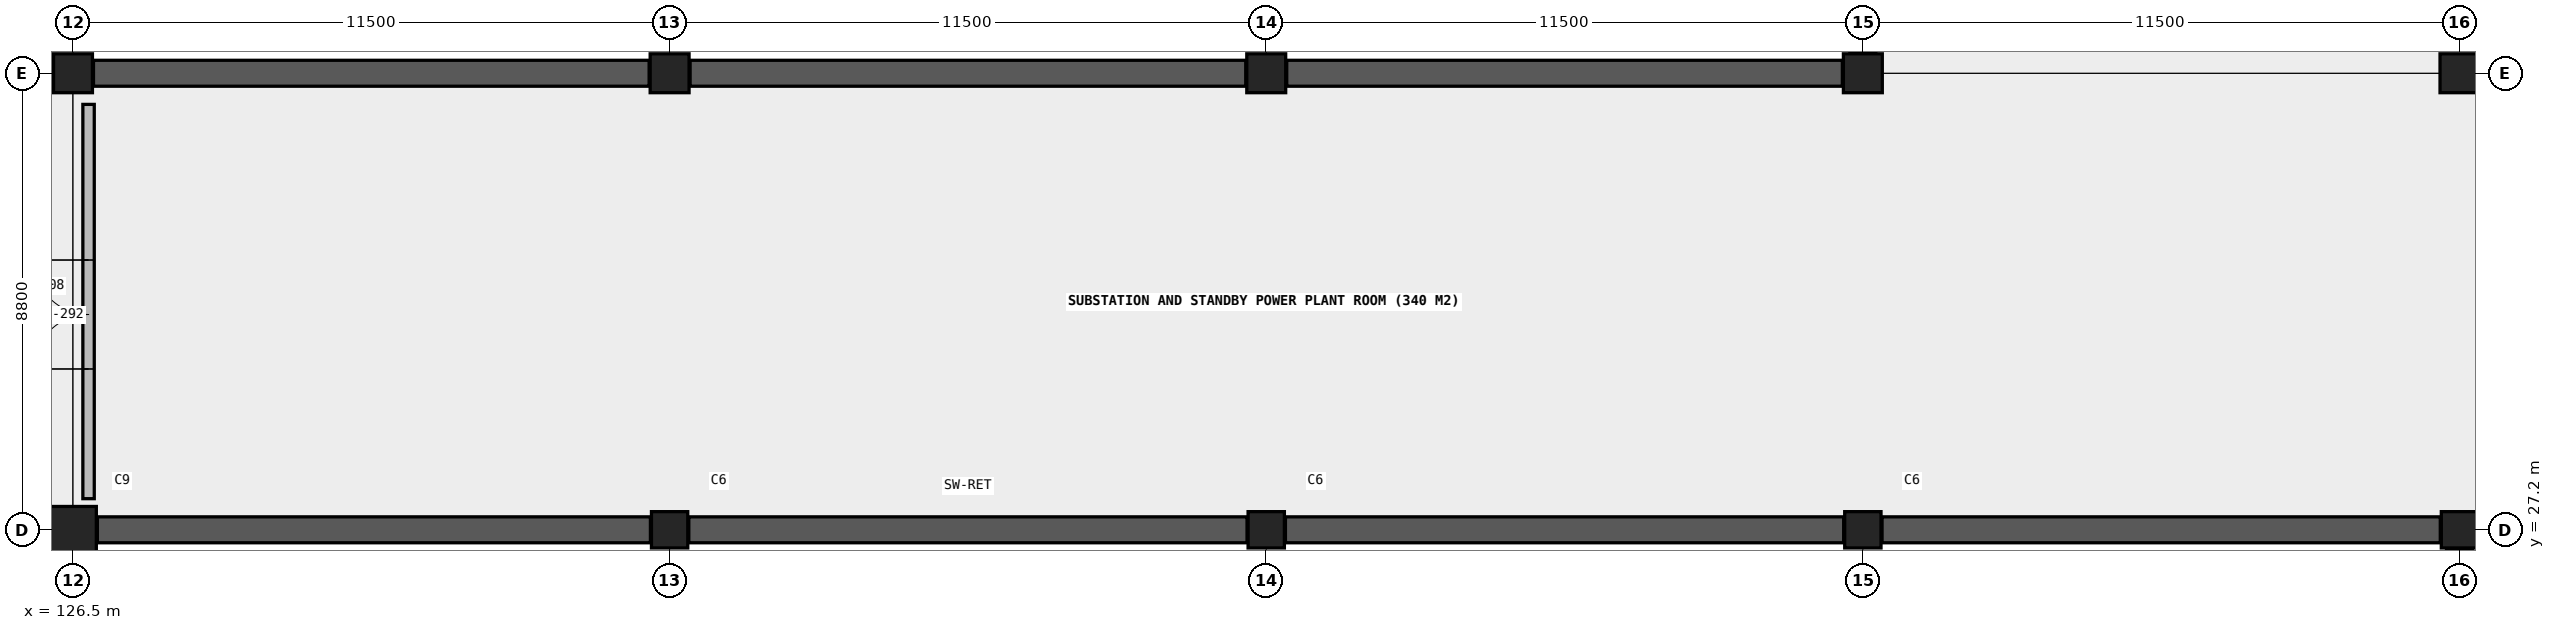
"""IFC4 building model, lengths in metres.
Left out: names, types, materials, properties, quantities, classifications, styles, units other than length and angle.
Written with IfcOpenShell. Run it as: python <this file> out.ifc"""

import sys

from ifc_helpers import new_model, si_unit, direction, frame, frame_2d, origin, origin_2d, place, context, subcontext, project, spatial, rectangle, circle, extrude, element, fill, save


model = new_model("IFC4")
c1 = context("Model", 3, precision=1e-05, world=origin(), true_north=direction((0.0, 1.0)))
c2 = subcontext(c1, "Body", "Model", "MODEL_VIEW")
j1 = project(units=[si_unit("LENGTHUNIT", "METRE"), si_unit("PLANEANGLEUNIT", "RADIAN")], contexts=[c1])
p1 = place(None, origin())
s1 = spatial("IfcSite", under=j1, at=p1, CompositionType="ELEMENT")
p2 = place(p1, origin())
s2 = spatial("IfcBuilding", under=s1, at=p2, CompositionType="ELEMENT")
p3 = place(p2, frame((0.0, 0.0, -4.2)))
s3 = spatial("IfcBuildingStorey", under=s2, at=p3, CompositionType="ELEMENT", Elevation=-4.2)
p4 = place(p3, frame((126.5, 27.2, 0.0), z_axis=(0.0, 0.0, 1.0), x_axis=(1.0, 0.0, 0.0)))
e1 = element("IfcColumn", 1, at=p4, inside=s3, PredefinedType="COLUMN", context=c2, shape_type="SweptSolid", body=[
    extrude(circle(Radius=0.45, at=origin_2d()), origin(), (0.0, 0.0, 1.0), 4.2),
])
p5 = place(p3, frame((126.5, 36.0, 0.0), z_axis=(0.0, 0.0, 1.0), x_axis=(1.0, 0.0, 0.0)))
e2 = element("IfcColumn", 2, at=p5, inside=s3, PredefinedType="COLUMN", context=c2, shape_type="SweptSolid", body=[
    extrude(rectangle(XDim=0.75, YDim=0.75, at=origin_2d()), origin(), (0.0, 0.0, 1.0), 4.2),
])
p6 = place(p3, frame((138.0, 27.2, 0.0), z_axis=(0.0, 0.0, 1.0), x_axis=(1.0, 0.0, 0.0)))
e3 = element("IfcColumn", 3, at=p6, inside=s3, PredefinedType="COLUMN", context=c2, shape_type="SweptSolid", body=[
    extrude(rectangle(XDim=0.7, YDim=0.7, at=origin_2d()), origin(), (0.0, 0.0, 1.0), 4.2),
])
p7 = place(p3, frame((138.0, 36.0, 0.0), z_axis=(0.0, 0.0, 1.0), x_axis=(1.0, 0.0, 0.0)))
e4 = element("IfcColumn", 4, at=p7, inside=s3, PredefinedType="COLUMN", context=c2, shape_type="SweptSolid", body=[
    extrude(rectangle(XDim=0.75, YDim=0.75, at=origin_2d()), origin(), (0.0, 0.0, 1.0), 4.2),
])
p8 = place(p3, frame((149.5, 27.2, 0.0), z_axis=(0.0, 0.0, 1.0), x_axis=(1.0, 0.0, 0.0)))
e5 = element("IfcColumn", 5, at=p8, inside=s3, PredefinedType="COLUMN", context=c2, shape_type="SweptSolid", body=[
    extrude(rectangle(XDim=0.7, YDim=0.7, at=origin_2d()), origin(), (0.0, 0.0, 1.0), 4.2),
])
p9 = place(p3, frame((149.5, 36.0, 0.0), z_axis=(0.0, 0.0, 1.0), x_axis=(1.0, 0.0, 0.0)))
e6 = element("IfcColumn", 6, at=p9, inside=s3, PredefinedType="COLUMN", context=c2, shape_type="SweptSolid", body=[
    extrude(rectangle(XDim=0.75, YDim=0.75, at=origin_2d()), origin(), (0.0, 0.0, 1.0), 4.2),
])
p10 = place(p3, frame((161.0, 27.2, 0.0), z_axis=(0.0, 0.0, 1.0), x_axis=(1.0, 0.0, 0.0)))
e7 = element("IfcColumn", 7, at=p10, inside=s3, PredefinedType="COLUMN", context=c2, shape_type="SweptSolid", body=[
    extrude(rectangle(XDim=0.7, YDim=0.7, at=origin_2d()), origin(), (0.0, 0.0, 1.0), 4.2),
])
p11 = place(p3, frame((161.0, 36.0, 0.0), z_axis=(0.0, 0.0, 1.0), x_axis=(1.0, 0.0, 0.0)))
e8 = element("IfcColumn", 8, at=p11, inside=s3, PredefinedType="COLUMN", context=c2, shape_type="SweptSolid", body=[
    extrude(rectangle(XDim=0.75, YDim=0.75, at=origin_2d()), origin(), (0.0, 0.0, 1.0), 4.2),
])
p12 = place(p3, frame((172.5, 27.2, 0.0), z_axis=(0.0, 0.0, 1.0), x_axis=(1.0, 0.0, 0.0)))
e9 = element("IfcColumn", 9, at=p12, inside=s3, PredefinedType="COLUMN", context=c2, shape_type="SweptSolid", body=[
    extrude(rectangle(XDim=0.7, YDim=0.7, at=origin_2d()), origin(), (0.0, 0.0, 1.0), 4.2),
])
p13 = place(p3, frame((172.5, 36.0, 0.0), z_axis=(0.0, 0.0, 1.0), x_axis=(1.0, 0.0, 0.0)))
e10 = element("IfcColumn", 10, at=p13, inside=s3, PredefinedType="COLUMN", context=c2, shape_type="SweptSolid", body=[
    extrude(rectangle(XDim=0.75, YDim=0.75, at=origin_2d()), origin(), (0.0, 0.0, 1.0), 4.2),
])
p14 = place(p3, frame((126.97, 27.2, 0.0), z_axis=(0.0, 0.0, 1.0), x_axis=(1.0, 0.0, 0.0)))
e11 = element("IfcWall", 11, at=p14, inside=s3, PredefinedType="SHEAR", context=c2, shape_type="SweptSolid", body=[
    extrude(rectangle(XDim=10.66, YDim=0.5, at=frame_2d((5.33, 0.0))), origin(), (0.0, 0.0, 1.0), 4.2),
])
for number, where, z_axis, x_axis in (
    (12, (138.37, 27.2, 0.0), (0.0, 0.0, 1.0), (1.0, 0.0, 0.0)),
    (13, (149.87, 27.2, 0.0), (0.0, 0.0, 1.0), (1.0, 0.0, 0.0)),
    (14, (161.37, 27.2, 0.0), (0.0, 0.0, 1.0), (1.0, 0.0, 0.0)),
):
    element("IfcWall", number, at=place(p3, frame(where, z_axis=z_axis, x_axis=x_axis)), inside=s3, PredefinedType="SHEAR", context=c2, shape_type="SweptSolid", body=[
        extrude(rectangle(XDim=10.76, YDim=0.5, at=frame_2d((5.38, 0.0))), origin(), (0.0, 0.0, 1.0), 4.2),
    ])
p15 = place(p3, frame((172.5, 17.97, 0.0), z_axis=(0.0, 0.0, 1.0), x_axis=(0.0, 1.0, 0.0)))
e15 = element("IfcWall", 15, at=p15, inside=s3, PredefinedType="SHEAR", context=c2, shape_type="SweptSolid", body=[
    extrude(rectangle(XDim=8.86, YDim=0.5, at=frame_2d((4.43, 0.0))), origin(), (0.0, 0.0, 1.0), 4.2),
])
for number, where, z_axis, x_axis in (
    (16, (115.395, 36.0, 0.0), (0.0, 0.0, 1.0), (1.0, 0.0, 0.0)),
    (17, (126.895, 36.0, 0.0), (0.0, 0.0, 1.0), (1.0, 0.0, 0.0)),
    (18, (138.395, 36.0, 0.0), (0.0, 0.0, 1.0), (1.0, 0.0, 0.0)),
    (19, (149.895, 36.0, 0.0), (0.0, 0.0, 1.0), (1.0, 0.0, 0.0)),
):
    element("IfcWall", number, at=place(p3, frame(where, z_axis=z_axis, x_axis=x_axis)), inside=s3, PredefinedType="SHEAR", context=c2, shape_type="SweptSolid", body=[
        extrude(rectangle(XDim=10.71, YDim=0.5, at=frame_2d((5.355, 0.0))), origin(), (0.0, 0.0, 1.0), 4.2),
    ])
p16 = place(p3, frame((161.0, 36.395, 0.0), z_axis=(0.0, 0.0, 1.0), x_axis=(0.0, 1.0, 0.0)))
e20 = element("IfcWall", 20, at=p16, inside=s3, PredefinedType="SHEAR", context=c2, shape_type="SweptSolid", body=[
    extrude(rectangle(XDim=41.21, YDim=0.5, at=frame_2d((20.605, 0.0))), origin(), (0.0, 0.0, 1.0), 4.2),
])
p17 = place(p3, frame((126.8, 27.8, 0.0), z_axis=(0.0, 0.0, 1.0), x_axis=(0.0, 1.0, 0.0)))
e21 = element("IfcWall", 21, at=p17, inside=s3, PredefinedType="SOLIDWALL", context=c2, shape_type="SweptSolid", body=[
    extrude(rectangle(XDim=7.6, YDim=0.22, at=frame_2d((3.8, 0.0))), origin(), (0.0, 0.0, 1.0), 2.98),
])
p18 = place(p17, frame((2.5, 0.0, 0.0)))
e22 = element("IfcOpeningElement", 22, at=p18, cuts=e21, PredefinedType="OPENING", context=c2, shape_type="SweptSolid", body=[
    extrude(rectangle(XDim=2.1, YDim=2.4, at=frame_2d((1.05, 1.2))), frame((0.0, 0.12, 0.0), z_axis=(0.0, -1.0, 0.0), x_axis=(1.0, 0.0, 0.0)), (0.0, 0.0, 1.0), 0.24),
])
p19 = place(p18, origin())
e23 = element("IfcDoor", 23, at=p19, inside=s3, OperationType="DOUBLE_DOOR_SINGLE_SWING", PredefinedType="DOOR", context=c2, shape_type="SweptSolid", body=[
    extrude(rectangle(XDim=2.1, YDim=2.4, at=frame_2d((1.05, 1.2))), frame((0.0, 0.025, 0.0), z_axis=(0.0, -1.0, 0.0), x_axis=(1.0, 0.0, 0.0)), (0.0, 0.0, 1.0), 0.05),
])
fill(e22, e23)
save(model, sys.argv[1])
